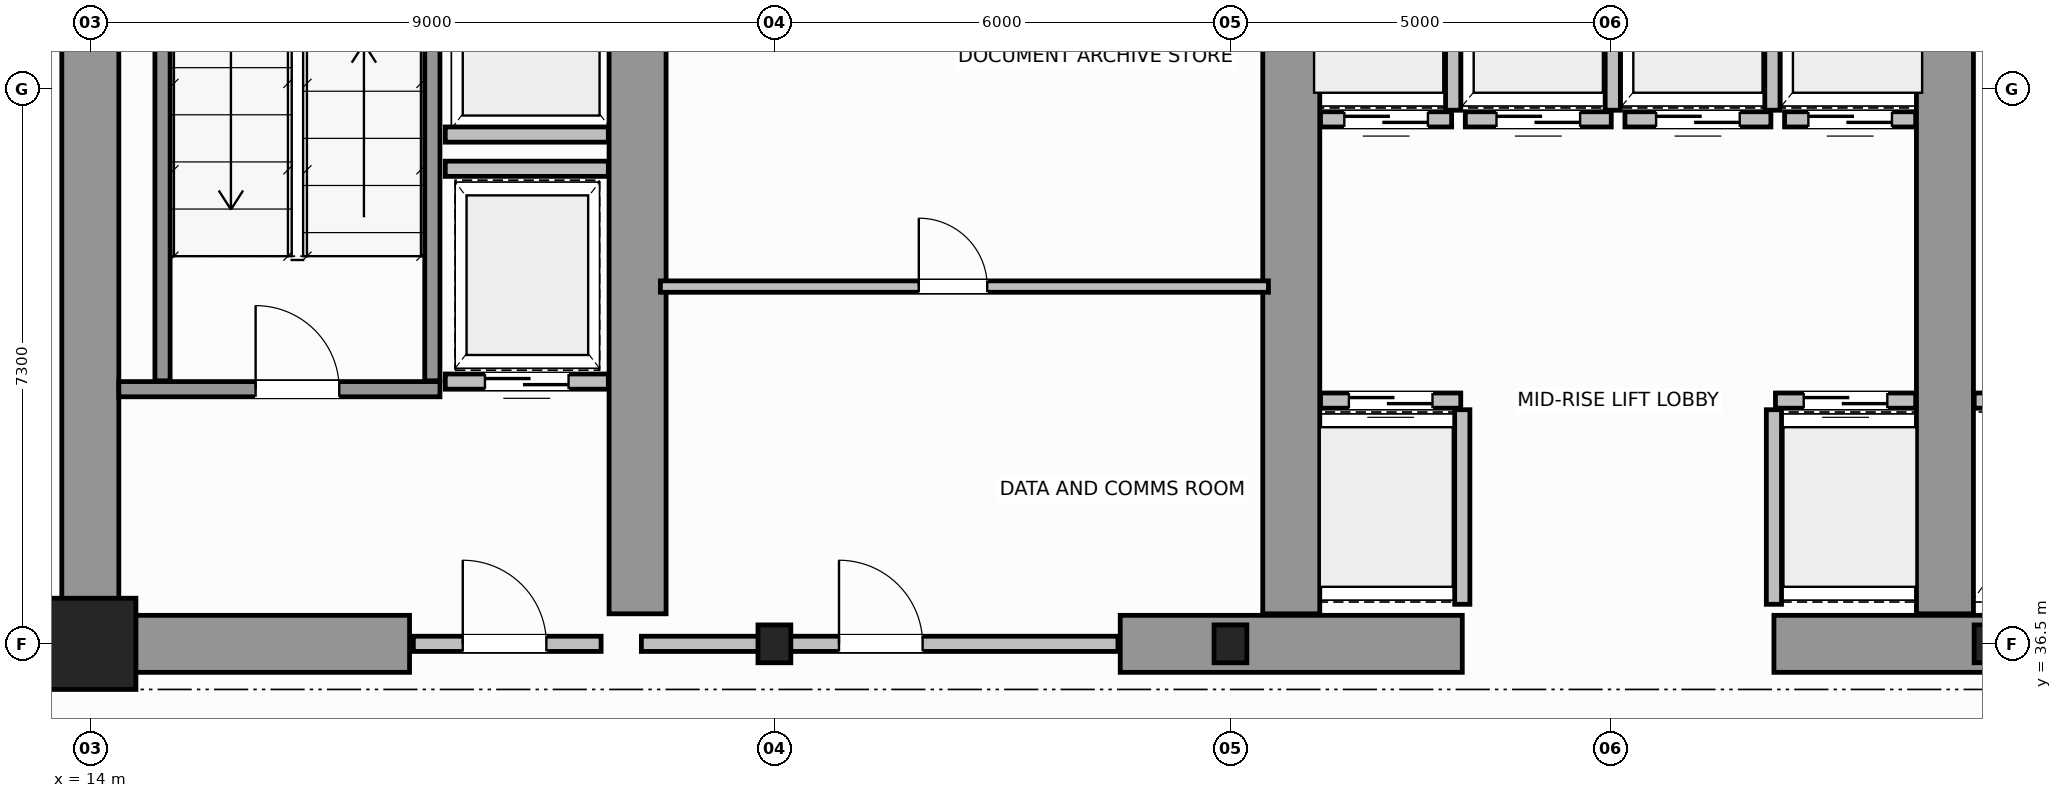
"""IFC4 building model, lengths in metres.
Left out: names, types, materials, properties, quantities, classifications, styles, units other than length and angle.
Written with IfcOpenShell. Run it as: python <this file> out.ifc"""

import sys

from ifc_helpers import new_model, si_unit, direction, frame, frame_2d, origin, origin_2d, place, context, subcontext, project, spatial, rectangle, i_section, extrude, source, transform, mapped, element, fill, save


model = new_model("IFC4")
c1 = context("Model", 3, precision=1e-05, world=origin(), true_north=direction((0.0, 1.0)))
c2 = subcontext(c1, "Body", "Model", "MODEL_VIEW")
j1 = project(units=[si_unit("LENGTHUNIT", "METRE"), si_unit("PLANEANGLEUNIT", "RADIAN")], contexts=[c1])
p1 = place(None, origin())
s1 = spatial("IfcSite", under=j1, at=p1, CompositionType="ELEMENT")
p2 = place(p1, origin())
s2 = spatial("IfcBuilding", under=s1, at=p2, CompositionType="ELEMENT")
p3 = place(p2, frame((0.0, 0.0, 145.2)))
s3 = spatial("IfcBuildingStorey", under=s2, at=p3, CompositionType="ELEMENT", Elevation=145.2)
m1 = source(origin(), c2, "Body", "SweptSolid", [
    extrude(rectangle(XDim=1.2, YDim=1.2, at=origin_2d()), origin(), (0.0, 0.0, 1.0), 3.8),
])
p4 = place(p3, frame((14.0, 36.5, 0.0), z_axis=(0.0, 0.0, 1.0), x_axis=(1.0, 0.0, 0.0)))
e1 = element("IfcColumn", 1, at=p4, inside=s3, PredefinedType="COLUMN", context=c2, shape_type="MappedRepresentation", body=[
    mapped(m1, transform((0.0, 0.0, 0.0), scale=1.0)),
])
m2 = source(origin(), c2, "Body", "SweptSolid", [
    extrude(i_section(OverallWidth=0.432, OverallDepth=0.498, WebThickness=0.055, FlangeThickness=0.068, FilletRadius=0.015, at=origin_2d()), origin(), (0.0, 0.0, 1.0), 3.8),
])
for number, where, z_axis, x_axis in (
    (2, (23.0, 36.5, 0.0), (0.0, 0.0, 1.0), (1.0, 0.0, 0.0)),
    (3, (29.0, 36.5, 0.0), (0.0, 0.0, 1.0), (1.0, 0.0, 0.0)),
    (4, (39.0, 36.5, 0.0), (0.0, 0.0, 1.0), (1.0, 0.0, 0.0)),
):
    element("IfcColumn", number, at=place(p3, frame(where, z_axis=z_axis, x_axis=x_axis)), inside=s3, PredefinedType="COLUMN", context=c2, shape_type="MappedRepresentation", body=[
        mapped(m2, transform((0.0, 0.0, 0.0), scale=1.0)),
    ])
p5 = place(p3, frame((14.0, 36.5, 0.0), z_axis=(0.0, 0.0, 1.0), x_axis=(0.0, 1.0, 0.0)))
e5 = element("IfcWall", 5, at=p5, inside=s3, PredefinedType="SHEAR", context=c2, shape_type="SweptSolid", body=[
    extrude(rectangle(XDim=14.5, YDim=0.75, at=frame_2d((7.25, 0.0))), origin(), (0.0, 0.0, 1.0), 3.8),
])
p6 = place(p3, frame((14.395, 36.5, 0.0), z_axis=(0.0, 0.0, 1.0), x_axis=(1.0, 0.0, 0.0)))
e6 = element("IfcWall", 6, at=p6, inside=s3, PredefinedType="SHEAR", context=c2, shape_type="SweptSolid", body=[
    extrude(rectangle(XDim=3.805, YDim=0.75, at=frame_2d((1.902, 0.0))), origin(), (0.0, 0.0, 1.0), 2.34),
])
for number, where, z_axis, x_axis in (
    (7, (27.55, 36.5, 0.0), (0.0, 0.0, 1.0), (1.0, 0.0, 0.0)),
    (8, (36.15, 36.5, 0.0), (0.0, 0.0, 1.0), (1.0, 0.0, 0.0)),
):
    element("IfcWall", number, at=place(p3, frame(where, z_axis=z_axis, x_axis=x_axis)), inside=s3, PredefinedType="SHEAR", context=c2, shape_type="SweptSolid", body=[
        extrude(rectangle(XDim=4.5, YDim=0.75, at=frame_2d((2.25, 0.0))), origin(), (0.0, 0.0, 1.0), 3.8),
    ])
for number, where, z_axis, x_axis in (
    (9, (21.2, 36.895, 0.0), (0.0, 0.0, 1.0), (0.0, 1.0, 0.0)),
    (10, (29.8, 36.895, 0.0), (0.0, 0.0, 1.0), (0.0, 1.0, 0.0)),
    (11, (38.4, 36.895, 0.0), (0.0, 0.0, 1.0), (0.0, 1.0, 0.0)),
):
    element("IfcWall", number, at=place(p3, frame(where, z_axis=z_axis, x_axis=x_axis)), inside=s3, PredefinedType="SHEAR", context=c2, shape_type="SweptSolid", body=[
        extrude(rectangle(XDim=9.305, YDim=0.75, at=frame_2d((4.652, 0.0))), origin(), (0.0, 0.0, 1.0), 3.8),
    ])
p7 = place(p3, frame((14.375, 39.85, 0.0), z_axis=(0.0, 0.0, 1.0), x_axis=(1.0, 0.0, 0.0)))
e12 = element("IfcWall", 12, at=p7, inside=s3, PredefinedType="SOLIDWALL", context=c2, shape_type="SweptSolid", body=[
    extrude(rectangle(XDim=4.225, YDim=0.2, at=frame_2d((2.113, 0.0))), origin(), (0.0, 0.0, 1.0), 3.8),
])
p8 = place(p7, frame((1.8, 0.0, 0.0)))
e13 = element("IfcOpeningElement", 13, at=p8, cuts=e12, PredefinedType="OPENING", context=c2, shape_type="SweptSolid", body=[
    extrude(rectangle(XDim=1.1, YDim=2.15, at=frame_2d((0.55, 1.075))), frame((0.0, 0.11, 0.0), z_axis=(0.0, -1.0, 0.0), x_axis=(1.0, 0.0, 0.0)), (0.0, 0.0, 1.0), 0.22),
])
for number, where, z_axis, x_axis in (
    (14, (14.95, 39.96, 0.0), (0.0, 0.0, 1.0), (0.0, 1.0, 0.0)),
    (15, (18.5, 39.96, 0.0), (0.0, 0.0, 1.0), (0.0, 1.0, 0.0)),
):
    element("IfcWall", number, at=place(p3, frame(where, z_axis=z_axis, x_axis=x_axis)), inside=s3, PredefinedType="SOLIDWALL", context=c2, shape_type="SweptSolid", body=[
        extrude(rectangle(XDim=9.93, YDim=0.2, at=frame_2d((4.965, 0.0))), origin(), (0.0, 0.0, 1.0), 3.8),
    ])
p9 = place(p3, frame((18.25, 36.5, 0.0), z_axis=(0.0, 0.0, 1.0), x_axis=(1.0, 0.0, 0.0)))
e16 = element("IfcWall", 16, at=p9, inside=s3, PredefinedType="SOLIDWALL", context=c2, shape_type="SweptSolid", body=[
    extrude(rectangle(XDim=2.47, YDim=0.2, at=frame_2d((1.235, 0.0))), origin(), (0.0, 0.0, 1.0), 2.33),
])
p10 = place(p9, frame((0.65, 0.0, 0.0)))
e17 = element("IfcOpeningElement", 17, at=p10, cuts=e16, PredefinedType="OPENING", context=c2, shape_type="SweptSolid", body=[
    extrude(rectangle(XDim=1.1, YDim=2.15, at=frame_2d((0.55, 1.075))), frame((0.0, 0.11, 0.0), z_axis=(0.0, -1.0, 0.0), x_axis=(1.0, 0.0, 0.0)), (0.0, 0.0, 1.0), 0.22),
])
p11 = place(p3, frame((30.185, 39.7, 0.0), z_axis=(0.0, 0.0, 1.0), x_axis=(1.0, 0.0, 0.0)))
e18 = element("IfcWall", 18, at=p11, inside=s3, PredefinedType="SOLIDWALL", context=c2, shape_type="SweptSolid", body=[
    extrude(rectangle(XDim=1.845, YDim=0.2, at=frame_2d((0.922, 0.0))), origin(), (0.0, 0.0, 1.0), 3.54),
])
p12 = place(p11, frame((0.373, 0.0, 0.0)))
e19 = element("IfcOpeningElement", 19, at=p12, cuts=e18, PredefinedType="OPENING", context=c2, shape_type="SweptSolid", body=[
    extrude(rectangle(XDim=1.1, YDim=2.15, at=frame_2d((0.55, 1.075))), frame((0.0, 0.11, 0.0), z_axis=(0.0, -1.0, 0.0), x_axis=(1.0, 0.0, 0.0)), (0.0, 0.0, 1.0), 0.22),
])
p13 = place(p3, frame((32.05, 37.02, 0.0), z_axis=(0.0, 0.0, 1.0), x_axis=(0.0, 1.0, 0.0)))
e20 = element("IfcWall", 20, at=p13, inside=s3, PredefinedType="SOLIDWALL", context=c2, shape_type="SweptSolid", body=[
    extrude(rectangle(XDim=2.56, YDim=0.2, at=frame_2d((1.28, 0.0))), origin(), (0.0, 0.0, 1.0), 3.54),
])
p14 = place(p3, frame((36.17, 39.7, 0.0), z_axis=(0.0, 0.0, 1.0), x_axis=(1.0, 0.0, 0.0)))
e21 = element("IfcWall", 21, at=p14, inside=s3, PredefinedType="SOLIDWALL", context=c2, shape_type="SweptSolid", body=[
    extrude(rectangle(XDim=1.845, YDim=0.2, at=frame_2d((0.922, 0.0))), origin(), (0.0, 0.0, 1.0), 3.54),
])
p15 = place(p14, frame((0.372, 0.0, 0.0)))
e22 = element("IfcOpeningElement", 22, at=p15, cuts=e21, PredefinedType="OPENING", context=c2, shape_type="SweptSolid", body=[
    extrude(rectangle(XDim=1.1, YDim=2.15, at=frame_2d((0.55, 1.075))), frame((0.0, 0.11, 0.0), z_axis=(0.0, -1.0, 0.0), x_axis=(1.0, 0.0, 0.0)), (0.0, 0.0, 1.0), 0.22),
])
p16 = place(p3, frame((36.15, 37.02, 0.0), z_axis=(0.0, 0.0, 1.0), x_axis=(0.0, 1.0, 0.0)))
e23 = element("IfcWall", 23, at=p16, inside=s3, PredefinedType="SOLIDWALL", context=c2, shape_type="SweptSolid", body=[
    extrude(rectangle(XDim=2.56, YDim=0.2, at=frame_2d((1.28, 0.0))), origin(), (0.0, 0.0, 1.0), 3.54),
])
p17 = place(p3, frame((30.185, 43.4, 0.0), z_axis=(0.0, 0.0, 1.0), x_axis=(1.0, 0.0, 0.0)))
e24 = element("IfcWall", 24, at=p17, inside=s3, PredefinedType="SOLIDWALL", context=c2, shape_type="SweptSolid", body=[
    extrude(rectangle(XDim=1.725, YDim=0.2, at=frame_2d((0.862, 0.0))), origin(), (0.0, 0.0, 1.0), 3.54),
])
p18 = place(p17, frame((0.313, 0.0, 0.0)))
e25 = element("IfcOpeningElement", 25, at=p18, cuts=e24, PredefinedType="OPENING", context=c2, shape_type="SweptSolid", body=[
    extrude(rectangle(XDim=1.1, YDim=2.15, at=frame_2d((0.55, 1.075))), frame((0.0, 0.11, 0.0), z_axis=(0.0, -1.0, 0.0), x_axis=(1.0, 0.0, 0.0)), (0.0, 0.0, 1.0), 0.22),
])
p19 = place(p3, frame((31.93, 43.52, 0.0), z_axis=(0.0, 0.0, 1.0), x_axis=(0.0, 1.0, 0.0)))
e26 = element("IfcWall", 26, at=p19, inside=s3, PredefinedType="SOLIDWALL", context=c2, shape_type="SweptSolid", body=[
    extrude(rectangle(XDim=2.56, YDim=0.2, at=frame_2d((1.28, 0.0))), origin(), (0.0, 0.0, 1.0), 3.54),
])
p20 = place(p3, frame((32.09, 43.4, 0.0), z_axis=(0.0, 0.0, 1.0), x_axis=(1.0, 0.0, 0.0)))
e27 = element("IfcWall", 27, at=p20, inside=s3, PredefinedType="SOLIDWALL", context=c2, shape_type="SweptSolid", body=[
    extrude(rectangle(XDim=1.92, YDim=0.2, at=frame_2d((0.96, 0.0))), origin(), (0.0, 0.0, 1.0), 3.54),
])
p21 = place(p20, frame((0.41, 0.0, 0.0)))
e28 = element("IfcOpeningElement", 28, at=p21, cuts=e27, PredefinedType="OPENING", context=c2, shape_type="SweptSolid", body=[
    extrude(rectangle(XDim=1.1, YDim=2.15, at=frame_2d((0.55, 1.075))), frame((0.0, 0.11, 0.0), z_axis=(0.0, -1.0, 0.0), x_axis=(1.0, 0.0, 0.0)), (0.0, 0.0, 1.0), 0.22),
])
p22 = place(p3, frame((34.03, 43.52, 0.0), z_axis=(0.0, 0.0, 1.0), x_axis=(0.0, 1.0, 0.0)))
e29 = element("IfcWall", 29, at=p22, inside=s3, PredefinedType="SOLIDWALL", context=c2, shape_type="SweptSolid", body=[
    extrude(rectangle(XDim=2.56, YDim=0.2, at=frame_2d((1.28, 0.0))), origin(), (0.0, 0.0, 1.0), 3.54),
])
p23 = place(p3, frame((34.19, 43.4, 0.0), z_axis=(0.0, 0.0, 1.0), x_axis=(1.0, 0.0, 0.0)))
e30 = element("IfcWall", 30, at=p23, inside=s3, PredefinedType="SOLIDWALL", context=c2, shape_type="SweptSolid", body=[
    extrude(rectangle(XDim=1.92, YDim=0.2, at=frame_2d((0.96, 0.0))), origin(), (0.0, 0.0, 1.0), 3.54),
])
p24 = place(p23, frame((0.41, 0.0, 0.0)))
e31 = element("IfcOpeningElement", 31, at=p24, cuts=e30, PredefinedType="OPENING", context=c2, shape_type="SweptSolid", body=[
    extrude(rectangle(XDim=1.1, YDim=2.15, at=frame_2d((0.55, 1.075))), frame((0.0, 0.11, 0.0), z_axis=(0.0, -1.0, 0.0), x_axis=(1.0, 0.0, 0.0)), (0.0, 0.0, 1.0), 0.22),
])
p25 = place(p3, frame((36.13, 43.52, 0.0), z_axis=(0.0, 0.0, 1.0), x_axis=(0.0, 1.0, 0.0)))
e32 = element("IfcWall", 32, at=p25, inside=s3, PredefinedType="SOLIDWALL", context=c2, shape_type="SweptSolid", body=[
    extrude(rectangle(XDim=2.56, YDim=0.2, at=frame_2d((1.28, 0.0))), origin(), (0.0, 0.0, 1.0), 3.54),
])
p26 = place(p3, frame((36.29, 43.4, 0.0), z_axis=(0.0, 0.0, 1.0), x_axis=(1.0, 0.0, 0.0)))
e33 = element("IfcWall", 33, at=p26, inside=s3, PredefinedType="SOLIDWALL", context=c2, shape_type="SweptSolid", body=[
    extrude(rectangle(XDim=1.725, YDim=0.2, at=frame_2d((0.862, 0.0))), origin(), (0.0, 0.0, 1.0), 3.54),
])
p27 = place(p26, frame((0.313, 0.0, 0.0)))
e34 = element("IfcOpeningElement", 34, at=p27, cuts=e33, PredefinedType="OPENING", context=c2, shape_type="SweptSolid", body=[
    extrude(rectangle(XDim=1.1, YDim=2.15, at=frame_2d((0.55, 1.075))), frame((0.0, 0.11, 0.0), z_axis=(0.0, -1.0, 0.0), x_axis=(1.0, 0.0, 0.0)), (0.0, 0.0, 1.0), 0.22),
])
p28 = place(p3, frame((38.785, 39.7, 0.0), z_axis=(0.0, 0.0, 1.0), x_axis=(1.0, 0.0, 0.0)))
e35 = element("IfcWall", 35, at=p28, inside=s3, PredefinedType="SOLIDWALL", context=c2, shape_type="SweptSolid", body=[
    extrude(rectangle(XDim=1.845, YDim=0.2, at=frame_2d((0.922, 0.0))), origin(), (0.0, 0.0, 1.0), 3.54),
])
p29 = place(p3, frame((18.67, 43.2, 0.0), z_axis=(0.0, 0.0, 1.0), x_axis=(1.0, 0.0, 0.0)))
e36 = element("IfcWall", 36, at=p29, inside=s3, PredefinedType="SOLIDWALL", context=c2, shape_type="SweptSolid", body=[
    extrude(rectangle(XDim=2.145, YDim=0.2, at=frame_2d((1.073, 0.0))), origin(), (0.0, 0.0, 1.0), 3.54),
])
p30 = place(p3, frame((18.67, 39.95, 0.0), z_axis=(0.0, 0.0, 1.0), x_axis=(1.0, 0.0, 0.0)))
e37 = element("IfcWall", 37, at=p30, inside=s3, PredefinedType="SOLIDWALL", context=c2, shape_type="SweptSolid", body=[
    extrude(rectangle(XDim=2.145, YDim=0.2, at=frame_2d((1.073, 0.0))), origin(), (0.0, 0.0, 1.0), 3.54),
])
p31 = place(p30, frame((0.522, 0.0, 0.0)))
e38 = element("IfcOpeningElement", 38, at=p31, cuts=e37, PredefinedType="OPENING", context=c2, shape_type="SweptSolid", body=[
    extrude(rectangle(XDim=1.1, YDim=2.15, at=frame_2d((0.55, 1.075))), frame((0.0, 0.11, 0.0), z_axis=(0.0, -1.0, 0.0), x_axis=(1.0, 0.0, 0.0)), (0.0, 0.0, 1.0), 0.22),
])
p32 = place(p3, frame((18.67, 42.75, 0.0), z_axis=(0.0, 0.0, 1.0), x_axis=(1.0, 0.0, 0.0)))
e39 = element("IfcWall", 39, at=p32, inside=s3, PredefinedType="SOLIDWALL", context=c2, shape_type="SweptSolid", body=[
    extrude(rectangle(XDim=2.145, YDim=0.2, at=frame_2d((1.073, 0.0))), origin(), (0.0, 0.0, 1.0), 3.54),
])
p33 = place(p3, frame((21.25, 36.5, 0.0), z_axis=(0.0, 0.0, 1.0), x_axis=(1.0, 0.0, 0.0)))
e40 = element("IfcWall", 40, at=p33, inside=s3, PredefinedType="SOLIDWALL", context=c2, shape_type="SweptSolid", body=[
    extrude(rectangle(XDim=6.27, YDim=0.2, at=frame_2d((3.135, 0.0))), origin(), (0.0, 0.0, 1.0), 2.33),
])
p34 = place(p33, frame((2.6, 0.0, 0.0)))
e41 = element("IfcOpeningElement", 41, at=p34, cuts=e40, PredefinedType="OPENING", context=c2, shape_type="SweptSolid", body=[
    extrude(rectangle(XDim=1.1, YDim=2.15, at=frame_2d((0.55, 1.075))), frame((0.0, 0.11, 0.0), z_axis=(0.0, -1.0, 0.0), x_axis=(1.0, 0.0, 0.0)), (0.0, 0.0, 1.0), 0.22),
])
p35 = place(p3, frame((21.5, 41.2, 0.0), z_axis=(0.0, 0.0, 1.0), x_axis=(1.0, 0.0, 0.0)))
e42 = element("IfcWall", 42, at=p35, inside=s3, PredefinedType="PARTITIONING", context=c2, shape_type="SweptSolid", body=[
    extrude(rectangle(XDim=8.0, YDim=0.15, at=frame_2d((4.0, 0.0))), origin(), (0.0, 0.0, 1.0), 3.54),
])
p36 = place(p35, frame((3.4, 0.0, 0.0)))
e43 = element("IfcOpeningElement", 43, at=p36, cuts=e42, PredefinedType="OPENING", context=c2, shape_type="SweptSolid", body=[
    extrude(rectangle(XDim=0.9, YDim=2.1, at=frame_2d((0.45, 1.05))), frame((0.0, 0.085, 0.0), z_axis=(0.0, -1.0, 0.0), x_axis=(1.0, 0.0, 0.0)), (0.0, 0.0, 1.0), 0.17),
])
p37 = place(p3, frame((7.262, 36.48, 0.0), z_axis=(0.0, 0.0, 1.0), x_axis=(1.0, 0.0, 0.0)))
e44 = element("IfcWall", 44, at=p37, inside=s3, PredefinedType="PARTITIONING", context=c2, shape_type="SweptSolid", body=[
    extrude(rectangle(XDim=6.678, YDim=0.12, at=frame_2d((3.339, 0.0))), origin(), (0.0, 0.0, 1.0), 2.83),
])
p38 = place(p37, frame((2.889, 0.0, 0.0)))
e45 = element("IfcOpeningElement", 45, at=p38, cuts=e44, PredefinedType="OPENING", context=c2, shape_type="SweptSolid", body=[
    extrude(rectangle(XDim=0.9, YDim=2.15, at=frame_2d((0.45, 1.075))), frame((0.0, 0.07, 0.0), z_axis=(0.0, -1.0, 0.0), x_axis=(1.0, 0.0, 0.0)), (0.0, 0.0, 1.0), 0.14),
])
m3 = source(origin(), c2, "Body", "SweptSolid", [
    extrude(rectangle(XDim=1.1, YDim=2.15, at=frame_2d((0.55, 1.075))), frame((0.0, 0.025, 0.0), z_axis=(0.0, -1.0, 0.0), x_axis=(1.0, 0.0, 0.0)), (0.0, 0.0, 1.0), 0.05),
])
p39 = place(p8, origin())
e46 = element("IfcDoor", 46, at=p39, inside=s3, OperationType="SINGLE_SWING_LEFT", PredefinedType="DOOR", context=c2, shape_type="MappedRepresentation", body=[
    mapped(m3, transform((0.0, 0.0, 0.0), scale=1.0)),
])
fill(e13, e46)
p40 = place(p10, origin())
e47 = element("IfcDoor", 47, at=p40, inside=s3, OperationType="SINGLE_SWING_RIGHT", PredefinedType="DOOR", context=c2, shape_type="MappedRepresentation", body=[
    mapped(m3, transform((0.0, 0.0, 0.0), scale=1.0)),
])
fill(e17, e47)
p41 = place(p12, origin())
e48 = element("IfcDoor", 48, at=p41, inside=s3, OperationType="DOUBLE_DOOR_SLIDING", PredefinedType="DOOR", context=c2, shape_type="MappedRepresentation", body=[
    mapped(m3, transform((0.0, 0.0, 0.0), scale=1.0)),
])
fill(e19, e48)
p42 = place(p15, origin())
e49 = element("IfcDoor", 49, at=p42, inside=s3, OperationType="DOUBLE_DOOR_SLIDING", PredefinedType="DOOR", context=c2, shape_type="MappedRepresentation", body=[
    mapped(m3, transform((0.0, 0.0, 0.0), scale=1.0)),
])
fill(e22, e49)
p43 = place(p18, origin())
e50 = element("IfcDoor", 50, at=p43, inside=s3, OperationType="DOUBLE_DOOR_SLIDING", PredefinedType="DOOR", context=c2, shape_type="MappedRepresentation", body=[
    mapped(m3, transform((0.0, 0.0, 0.0), scale=1.0)),
])
fill(e25, e50)
p44 = place(p21, origin())
e51 = element("IfcDoor", 51, at=p44, inside=s3, OperationType="DOUBLE_DOOR_SLIDING", PredefinedType="DOOR", context=c2, shape_type="MappedRepresentation", body=[
    mapped(m3, transform((0.0, 0.0, 0.0), scale=1.0)),
])
fill(e28, e51)
p45 = place(p24, origin())
e52 = element("IfcDoor", 52, at=p45, inside=s3, OperationType="DOUBLE_DOOR_SLIDING", PredefinedType="DOOR", context=c2, shape_type="MappedRepresentation", body=[
    mapped(m3, transform((0.0, 0.0, 0.0), scale=1.0)),
])
fill(e31, e52)
p46 = place(p27, origin())
e53 = element("IfcDoor", 53, at=p46, inside=s3, OperationType="DOUBLE_DOOR_SLIDING", PredefinedType="DOOR", context=c2, shape_type="MappedRepresentation", body=[
    mapped(m3, transform((0.0, 0.0, 0.0), scale=1.0)),
])
fill(e34, e53)
p47 = place(p31, origin())
e54 = element("IfcDoor", 54, at=p47, inside=s3, OperationType="DOUBLE_DOOR_SLIDING", PredefinedType="DOOR", context=c2, shape_type="MappedRepresentation", body=[
    mapped(m3, transform((0.0, 0.0, 0.0), scale=1.0)),
])
fill(e38, e54)
p48 = place(p34, origin())
e55 = element("IfcDoor", 55, at=p48, inside=s3, OperationType="SINGLE_SWING_LEFT", PredefinedType="DOOR", context=c2, shape_type="MappedRepresentation", body=[
    mapped(m3, transform((0.0, 0.0, 0.0), scale=1.0)),
])
fill(e41, e55)
m4 = source(origin(), c2, "Body", "SweptSolid", [
    extrude(rectangle(XDim=0.9, YDim=2.1, at=frame_2d((0.45, 1.05))), frame((0.0, 0.025, 0.0), z_axis=(0.0, -1.0, 0.0), x_axis=(1.0, 0.0, 0.0)), (0.0, 0.0, 1.0), 0.05),
])
p49 = place(p36, origin())
e56 = element("IfcDoor", 56, at=p49, inside=s3, OperationType="SINGLE_SWING_RIGHT", PredefinedType="DOOR", context=c2, shape_type="MappedRepresentation", body=[
    mapped(m4, transform((0.0, 0.0, 0.0), scale=1.0)),
])
fill(e43, e56)
save(model, sys.argv[1])
